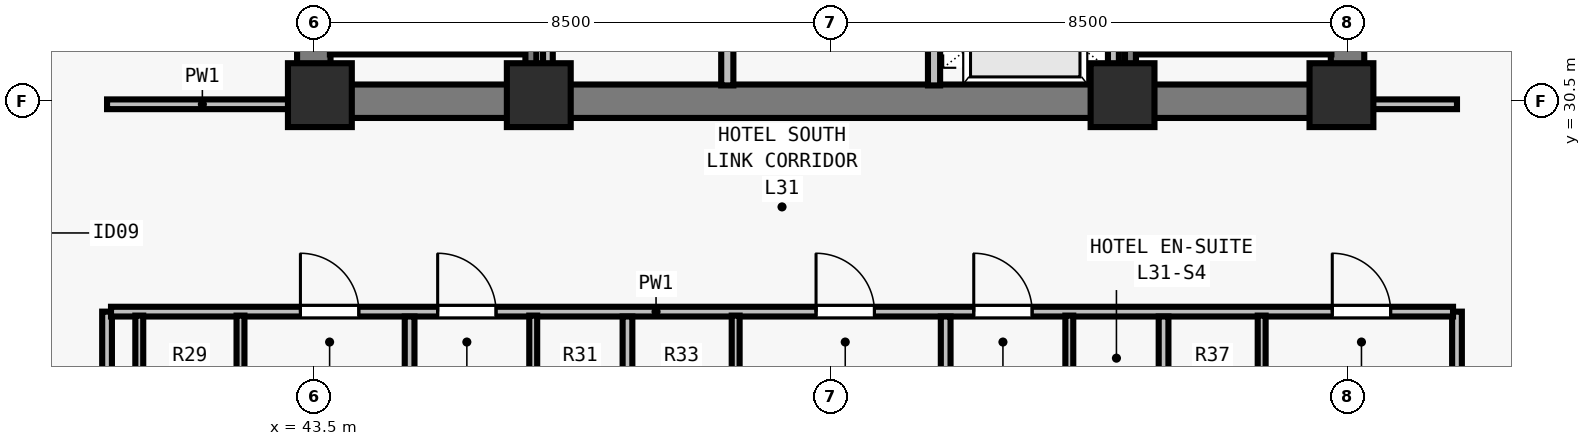
"""IFC4 building model, lengths in metres.
Left out: names, types, materials, properties, quantities, classifications, styles, units other than length and angle.
Written with IfcOpenShell. Run it as: python <this file> out.ifc"""

import sys

from ifc_helpers import new_model, si_unit, direction, frame, frame_2d, origin, origin_2d, place, context, subcontext, project, spatial, rectangle, extrude, element, fill, save


model = new_model("IFC4")
c1 = context("Model", 3, precision=1e-05, world=origin(), true_north=direction((0.0, 1.0)))
c2 = subcontext(c1, "Body", "Model", "MODEL_VIEW")
j1 = project(units=[si_unit("LENGTHUNIT", "METRE"), si_unit("PLANEANGLEUNIT", "RADIAN")], contexts=[c1])
p1 = place(None, origin())
s1 = spatial("IfcSite", under=j1, at=p1, CompositionType="ELEMENT")
p2 = place(p1, origin())
s2 = spatial("IfcBuilding", under=s1, at=p2, CompositionType="ELEMENT")
p3 = place(p2, frame((0.0, 0.0, 116.5)))
s3 = spatial("IfcBuildingStorey", under=s2, at=p3, CompositionType="ELEMENT", Elevation=116.5)
for number, where, z_axis, x_axis in (
    (1, (43.6, 30.6, 0.0), (0.0, 0.0, 1.0), (1.0, 0.0, 0.0)),
    (2, (47.2, 30.6, 0.0), (0.0, 0.0, 1.0), (1.0, 0.0, 0.0)),
    (3, (56.8, 30.6, 0.0), (0.0, 0.0, 1.0), (1.0, 0.0, 0.0)),
    (4, (60.4, 30.6, 0.0), (0.0, 0.0, 1.0), (1.0, 0.0, 0.0)),
):
    element("IfcColumn", number, at=place(p3, frame(where, z_axis=z_axis, x_axis=x_axis)), inside=s3, PredefinedType="COLUMN", context=c2, shape_type="SweptSolid", body=[
        extrude(rectangle(XDim=1.05, YDim=1.05, at=origin_2d()), origin(), (0.0, 0.0, 1.0), 3.5),
    ])
p4 = place(p3, frame((43.225, 30.5, 0.0), z_axis=(0.0, 0.0, 1.0), x_axis=(1.0, 0.0, 0.0)))
e5 = element("IfcWall", 5, at=p4, inside=s3, PredefinedType="SHEAR", context=c2, shape_type="SweptSolid", body=[
    extrude(rectangle(XDim=17.55, YDim=0.55, at=frame_2d((8.775, 0.0))), origin(), (0.0, 0.0, 1.0), 3.28),
])
for number, where, z_axis, x_axis in (
    (6, (43.5, 30.765, 0.0), (0.0, 0.0, 1.0), (0.0, 1.0, 0.0)),
    (7, (60.5, 30.765, 0.0), (0.0, 0.0, 1.0), (0.0, 1.0, 0.0)),
):
    element("IfcWall", number, at=place(p3, frame(where, z_axis=z_axis, x_axis=x_axis)), inside=s3, PredefinedType="SHEAR", context=c2, shape_type="SweptSolid", body=[
        extrude(rectangle(XDim=7.985, YDim=0.55, at=frame_2d((3.993, 0.0))), origin(), (0.0, 0.0, 1.0), 3.28),
    ])
p5 = place(p3, frame((50.3, 30.76, 0.0), z_axis=(0.0, 0.0, 1.0), x_axis=(0.0, 1.0, 0.0)))
e8 = element("IfcWall", 8, at=p5, inside=s3, PredefinedType="SOLIDWALL", context=c2, shape_type="SweptSolid", body=[
    extrude(rectangle(XDim=7.855, YDim=0.2, at=frame_2d((3.927, 0.0))), origin(), (0.0, 0.0, 1.0), 3.28),
])
p6 = place(p5, frame((3.29, 0.0, 0.0)))
e9 = element("IfcOpeningElement", 9, at=p6, cuts=e8, PredefinedType="OPENING", context=c2, shape_type="SweptSolid", body=[
    extrude(rectangle(XDim=0.9, YDim=2.12, at=frame_2d((0.45, 1.06))), frame((0.0, 0.11, 0.0), z_axis=(0.0, -1.0, 0.0), x_axis=(1.0, 0.0, 0.0)), (0.0, 0.0, 1.0), 0.22),
])
p7 = place(p3, frame((53.7, 30.76, 0.0), z_axis=(0.0, 0.0, 1.0), x_axis=(0.0, 1.0, 0.0)))
e10 = element("IfcWall", 10, at=p7, inside=s3, PredefinedType="SOLIDWALL", context=c2, shape_type="SweptSolid", body=[
    extrude(rectangle(XDim=7.855, YDim=0.2, at=frame_2d((3.927, 0.0))), origin(), (0.0, 0.0, 1.0), 3.28),
])
p8 = place(p7, frame((0.79, 0.0, 0.0)))
e11 = element("IfcOpeningElement", 11, at=p8, cuts=e10, PredefinedType="OPENING", context=c2, shape_type="SweptSolid", body=[
    extrude(rectangle(XDim=1.1, YDim=2.2, at=frame_2d((0.55, 1.1))), frame((0.0, 0.11, 0.0), z_axis=(0.0, -1.0, 0.0), x_axis=(1.0, 0.0, 0.0)), (0.0, 0.0, 1.0), 0.22),
])
p9 = place(p7, frame((3.49, 0.0, 0.0)))
e12 = element("IfcOpeningElement", 12, at=p9, cuts=e10, PredefinedType="OPENING", context=c2, shape_type="SweptSolid", body=[
    extrude(rectangle(XDim=1.1, YDim=2.2, at=frame_2d((0.55, 1.1))), frame((0.0, 0.11, 0.0), z_axis=(0.0, -1.0, 0.0), x_axis=(1.0, 0.0, 0.0)), (0.0, 0.0, 1.0), 0.22),
])
p10 = place(p7, frame((6.19, 0.0, 0.0)))
e13 = element("IfcOpeningElement", 13, at=p10, cuts=e10, PredefinedType="OPENING", context=c2, shape_type="SweptSolid", body=[
    extrude(rectangle(XDim=1.1, YDim=2.2, at=frame_2d((0.55, 1.1))), frame((0.0, 0.11, 0.0), z_axis=(0.0, -1.0, 0.0), x_axis=(1.0, 0.0, 0.0)), (0.0, 0.0, 1.0), 0.22),
])
p11 = place(p3, frame((47.35, 30.76, 0.0), z_axis=(0.0, 0.0, 1.0), x_axis=(0.0, 1.0, 0.0)))
e14 = element("IfcWall", 14, at=p11, inside=s3, PredefinedType="PARTITIONING", context=c2, shape_type="SweptSolid", body=[
    extrude(rectangle(XDim=7.855, YDim=0.16, at=frame_2d((3.927, 0.0))), origin(), (0.0, 0.0, 1.0), 3.28),
])
p12 = place(p3, frame((56.65, 30.76, 0.0), z_axis=(0.0, 0.0, 1.0), x_axis=(0.0, 1.0, 0.0)))
e15 = element("IfcWall", 15, at=p12, inside=s3, PredefinedType="SOLIDWALL", context=c2, shape_type="SweptSolid", body=[
    extrude(rectangle(XDim=7.855, YDim=0.18, at=frame_2d((3.927, 0.0))), origin(), (0.0, 0.0, 1.0), 3.28),
])
p13 = place(p3, frame((40.1, 15.325, 0.0), z_axis=(0.0, 0.0, 1.0), x_axis=(0.0, 1.0, 0.0)))
e16 = element("IfcWall", 16, at=p13, inside=s3, PredefinedType="PARTITIONING", context=c2, shape_type="SweptSolid", body=[
    extrude(rectangle(XDim=11.715, YDim=0.16, at=frame_2d((5.857, 0.0))), origin(), (0.0, 0.0, 1.0), 2.555),
])
p14 = place(p3, frame((40.1, 30.45, 0.0), z_axis=(0.0, 0.0, 1.0), x_axis=(1.0, 0.0, 0.0)))
e17 = element("IfcWall", 17, at=p14, inside=s3, PredefinedType="PARTITIONING", context=c2, shape_type="SweptSolid", body=[
    extrude(rectangle(XDim=3.135, YDim=0.16, at=frame_2d((1.567, 0.0))), origin(), (0.0, 0.0, 1.0), 3.28),
])
p15 = place(p3, frame((62.3, 15.325, 0.0), z_axis=(0.0, 0.0, 1.0), x_axis=(0.0, 1.0, 0.0)))
e18 = element("IfcWall", 18, at=p15, inside=s3, PredefinedType="PARTITIONING", context=c2, shape_type="SweptSolid", body=[
    extrude(rectangle(XDim=11.715, YDim=0.16, at=frame_2d((5.857, 0.0))), origin(), (0.0, 0.0, 1.0), 3.28),
])
p16 = place(p3, frame((60.765, 30.45, 0.0), z_axis=(0.0, 0.0, 1.0), x_axis=(1.0, 0.0, 0.0)))
e19 = element("IfcWall", 19, at=p16, inside=s3, PredefinedType="PARTITIONING", context=c2, shape_type="SweptSolid", body=[
    extrude(rectangle(XDim=1.535, YDim=0.16, at=frame_2d((0.768, 0.0))), origin(), (0.0, 0.0, 1.0), 3.28),
])
p17 = place(p3, frame((40.165, 27.04, 0.0), z_axis=(0.0, 0.0, 1.0), x_axis=(1.0, 0.0, 0.0)))
e20 = element("IfcWall", 20, at=p17, inside=s3, PredefinedType="PARTITIONING", context=c2, shape_type="SweptSolid", body=[
    extrude(rectangle(XDim=22.07, YDim=0.16, at=frame_2d((11.035, 0.0))), origin(), (0.0, 0.0, 1.0), 3.28),
])
p18 = place(p17, frame((3.115, 0.0, 0.0)))
e21 = element("IfcOpeningElement", 21, at=p18, cuts=e20, PredefinedType="OPENING", context=c2, shape_type="SweptSolid", body=[
    extrude(rectangle(XDim=0.96, YDim=2.15, at=frame_2d((0.48, 1.075))), frame((0.0, 0.09, 0.0), z_axis=(0.0, -1.0, 0.0), x_axis=(1.0, 0.0, 0.0)), (0.0, 0.0, 1.0), 0.18),
])
p19 = place(p17, frame((5.372, 0.0, 0.0)))
e22 = element("IfcOpeningElement", 22, at=p19, cuts=e20, PredefinedType="OPENING", context=c2, shape_type="SweptSolid", body=[
    extrude(rectangle(XDim=0.96, YDim=2.15, at=frame_2d((0.48, 1.075))), frame((0.0, 0.09, 0.0), z_axis=(0.0, -1.0, 0.0), x_axis=(1.0, 0.0, 0.0)), (0.0, 0.0, 1.0), 0.18),
])
p20 = place(p17, frame((11.594, 0.0, 0.0)))
e23 = element("IfcOpeningElement", 23, at=p20, cuts=e20, PredefinedType="OPENING", context=c2, shape_type="SweptSolid", body=[
    extrude(rectangle(XDim=0.96, YDim=2.15, at=frame_2d((0.48, 1.075))), frame((0.0, 0.09, 0.0), z_axis=(0.0, -1.0, 0.0), x_axis=(1.0, 0.0, 0.0)), (0.0, 0.0, 1.0), 0.18),
])
p21 = place(p17, frame((14.188, 0.0, 0.0)))
e24 = element("IfcOpeningElement", 24, at=p21, cuts=e20, PredefinedType="OPENING", context=c2, shape_type="SweptSolid", body=[
    extrude(rectangle(XDim=0.96, YDim=2.15, at=frame_2d((0.48, 1.075))), frame((0.0, 0.09, 0.0), z_axis=(0.0, -1.0, 0.0), x_axis=(1.0, 0.0, 0.0)), (0.0, 0.0, 1.0), 0.18),
])
p22 = place(p17, frame((20.084, 0.0, 0.0)))
e25 = element("IfcOpeningElement", 25, at=p22, cuts=e20, PredefinedType="OPENING", context=c2, shape_type="SweptSolid", body=[
    extrude(rectangle(XDim=0.96, YDim=2.15, at=frame_2d((0.48, 1.075))), frame((0.0, 0.09, 0.0), z_axis=(0.0, -1.0, 0.0), x_axis=(1.0, 0.0, 0.0)), (0.0, 0.0, 1.0), 0.18),
])
p23 = place(p3, frame((40.63, 24.66, 0.0), z_axis=(0.0, 0.0, 1.0), x_axis=(0.0, 1.0, 0.0)))
e26 = element("IfcWall", 26, at=p23, inside=s3, PredefinedType="PLUMBINGWALL", context=c2, shape_type="SweptSolid", body=[
    extrude(rectangle(XDim=2.315, YDim=0.13, at=frame_2d((1.158, 0.0))), origin(), (0.0, 0.0, 1.0), 2.555),
])
p24 = place(p3, frame((42.294, 24.66, 0.0), z_axis=(0.0, 0.0, 1.0), x_axis=(0.0, 1.0, 0.0)))
e27 = element("IfcWall", 27, at=p24, inside=s3, PredefinedType="PLUMBINGWALL", context=c2, shape_type="SweptSolid", body=[
    extrude(rectangle(XDim=2.315, YDim=0.13, at=frame_2d((1.158, 0.0))), origin(), (0.0, 0.0, 1.0), 3.28),
])
p25 = place(p3, frame((45.075, 15.325, 0.0), z_axis=(0.0, 0.0, 1.0), x_axis=(0.0, 1.0, 0.0)))
e28 = element("IfcWall", 28, at=p25, inside=s3, PredefinedType="PARTITIONING", context=c2, shape_type="SweptSolid", body=[
    extrude(rectangle(XDim=11.635, YDim=0.16, at=frame_2d((5.817, 0.0))), origin(), (0.0, 0.0, 1.0), 3.28),
])
p26 = place(p3, frame((47.108, 24.66, 0.0), z_axis=(0.0, 0.0, 1.0), x_axis=(0.0, 1.0, 0.0)))
e29 = element("IfcWall", 29, at=p26, inside=s3, PredefinedType="PLUMBINGWALL", context=c2, shape_type="SweptSolid", body=[
    extrude(rectangle(XDim=2.315, YDim=0.13, at=frame_2d((1.158, 0.0))), origin(), (0.0, 0.0, 1.0), 2.555),
])
p27 = place(p3, frame((48.658, 15.325, 0.0), z_axis=(0.0, 0.0, 1.0), x_axis=(0.0, 1.0, 0.0)))
e30 = element("IfcWall", 30, at=p27, inside=s3, PredefinedType="PARTITIONING", context=c2, shape_type="SweptSolid", body=[
    extrude(rectangle(XDim=11.635, YDim=0.16, at=frame_2d((5.817, 0.0))), origin(), (0.0, 0.0, 1.0), 2.896),
])
p28 = place(p3, frame((50.438, 24.66, 0.0), z_axis=(0.0, 0.0, 1.0), x_axis=(0.0, 1.0, 0.0)))
e31 = element("IfcWall", 31, at=p28, inside=s3, PredefinedType="PLUMBINGWALL", context=c2, shape_type="SweptSolid", body=[
    extrude(rectangle(XDim=2.315, YDim=0.13, at=frame_2d((1.158, 0.0))), origin(), (0.0, 0.0, 1.0), 3.28),
])
p29 = place(p3, frame((53.892, 15.325, 0.0), z_axis=(0.0, 0.0, 1.0), x_axis=(0.0, 1.0, 0.0)))
e32 = element("IfcWall", 32, at=p29, inside=s3, PredefinedType="PARTITIONING", context=c2, shape_type="SweptSolid", body=[
    extrude(rectangle(XDim=11.635, YDim=0.16, at=frame_2d((5.817, 0.0))), origin(), (0.0, 0.0, 1.0), 2.896),
])
p30 = place(p3, frame((55.925, 24.66, 0.0), z_axis=(0.0, 0.0, 1.0), x_axis=(0.0, 1.0, 0.0)))
e33 = element("IfcWall", 33, at=p30, inside=s3, PredefinedType="PLUMBINGWALL", context=c2, shape_type="SweptSolid", body=[
    extrude(rectangle(XDim=2.315, YDim=0.13, at=frame_2d((1.158, 0.0))), origin(), (0.0, 0.0, 1.0), 3.28),
])
p31 = place(p3, frame((57.475, 15.325, 0.0), z_axis=(0.0, 0.0, 1.0), x_axis=(0.0, 1.0, 0.0)))
e34 = element("IfcWall", 34, at=p31, inside=s3, PredefinedType="PARTITIONING", context=c2, shape_type="SweptSolid", body=[
    extrude(rectangle(XDim=11.635, YDim=0.16, at=frame_2d((5.817, 0.0))), origin(), (0.0, 0.0, 1.0), 3.28),
])
p32 = place(p3, frame((59.088, 24.66, 0.0), z_axis=(0.0, 0.0, 1.0), x_axis=(0.0, 1.0, 0.0)))
e35 = element("IfcWall", 35, at=p32, inside=s3, PredefinedType="PLUMBINGWALL", context=c2, shape_type="SweptSolid", body=[
    extrude(rectangle(XDim=2.315, YDim=0.13, at=frame_2d((1.158, 0.0))), origin(), (0.0, 0.0, 1.0), 3.28),
])
p33 = place(p3, frame((43.765, 31.36, 0.0), z_axis=(0.0, 0.0, 1.0), x_axis=(1.0, 0.0, 0.0)))
e36 = element("IfcWall", 36, at=p33, inside=s3, PredefinedType="SOLIDWALL", context=c2, shape_type="SweptSolid", body=[
    extrude(rectangle(XDim=3.23, YDim=0.18, at=frame_2d((1.615, 0.0))), origin(), (0.0, 0.0, 1.0), 3.28),
])
p34 = place(p3, frame((47.07, 38.78, 0.0), z_axis=(0.0, 0.0, 1.0), x_axis=(0.0, -1.0, 0.0)))
e37 = element("IfcWall", 37, at=p34, inside=s3, PredefinedType="SOLIDWALL", context=c2, shape_type="SweptSolid", body=[
    extrude(rectangle(XDim=8.017, YDim=0.18, at=frame_2d((4.009, 0.0))), origin(), (0.0, 0.0, 1.0), 3.28),
])
p35 = place(p3, frame((57.005, 31.36, 0.0), z_axis=(0.0, 0.0, 1.0), x_axis=(1.0, 0.0, 0.0)))
e38 = element("IfcWall", 38, at=p35, inside=s3, PredefinedType="SOLIDWALL", context=c2, shape_type="SweptSolid", body=[
    extrude(rectangle(XDim=3.23, YDim=0.18, at=frame_2d((1.615, 0.0))), origin(), (0.0, 0.0, 1.0), 3.28),
])
p36 = place(p3, frame((56.93, 38.78, 0.0), z_axis=(0.0, 0.0, 1.0), x_axis=(0.0, -1.0, 0.0)))
e39 = element("IfcWall", 39, at=p36, inside=s3, PredefinedType="SOLIDWALL", context=c2, shape_type="SweptSolid", body=[
    extrude(rectangle(XDim=8.017, YDim=0.18, at=frame_2d((4.009, 0.0))), origin(), (0.0, 0.0, 1.0), 3.28),
])
p37 = place(p18, origin())
e40 = element("IfcDoor", 40, at=p37, inside=s3, OperationType="SINGLE_SWING_LEFT", PredefinedType="DOOR", context=c2, shape_type="SweptSolid", body=[
    extrude(rectangle(XDim=0.96, YDim=2.15, at=frame_2d((0.48, 1.075))), frame((0.0, 0.025, 0.0), z_axis=(0.0, -1.0, 0.0), x_axis=(1.0, 0.0, 0.0)), (0.0, 0.0, 1.0), 0.05),
])
fill(e21, e40)
p38 = place(p19, origin())
e41 = element("IfcDoor", 41, at=p38, inside=s3, OperationType="SINGLE_SWING_LEFT", PredefinedType="DOOR", context=c2, shape_type="SweptSolid", body=[
    extrude(rectangle(XDim=0.96, YDim=2.15, at=frame_2d((0.48, 1.075))), frame((0.0, 0.025, 0.0), z_axis=(0.0, -1.0, 0.0), x_axis=(1.0, 0.0, 0.0)), (0.0, 0.0, 1.0), 0.05),
])
fill(e22, e41)
p39 = place(p20, origin())
e42 = element("IfcDoor", 42, at=p39, inside=s3, OperationType="SINGLE_SWING_LEFT", PredefinedType="DOOR", context=c2, shape_type="SweptSolid", body=[
    extrude(rectangle(XDim=0.96, YDim=2.15, at=frame_2d((0.48, 1.075))), frame((0.0, 0.025, 0.0), z_axis=(0.0, -1.0, 0.0), x_axis=(1.0, 0.0, 0.0)), (0.0, 0.0, 1.0), 0.05),
])
fill(e23, e42)
p40 = place(p21, origin())
e43 = element("IfcDoor", 43, at=p40, inside=s3, OperationType="SINGLE_SWING_LEFT", PredefinedType="DOOR", context=c2, shape_type="SweptSolid", body=[
    extrude(rectangle(XDim=0.96, YDim=2.15, at=frame_2d((0.48, 1.075))), frame((0.0, 0.025, 0.0), z_axis=(0.0, -1.0, 0.0), x_axis=(1.0, 0.0, 0.0)), (0.0, 0.0, 1.0), 0.05),
])
fill(e24, e43)
p41 = place(p22, origin())
e44 = element("IfcDoor", 44, at=p41, inside=s3, OperationType="SINGLE_SWING_LEFT", PredefinedType="DOOR", context=c2, shape_type="SweptSolid", body=[
    extrude(rectangle(XDim=0.96, YDim=2.15, at=frame_2d((0.48, 1.075))), frame((0.0, 0.025, 0.0), z_axis=(0.0, -1.0, 0.0), x_axis=(1.0, 0.0, 0.0)), (0.0, 0.0, 1.0), 0.05),
])
fill(e25, e44)
save(model, sys.argv[1])
